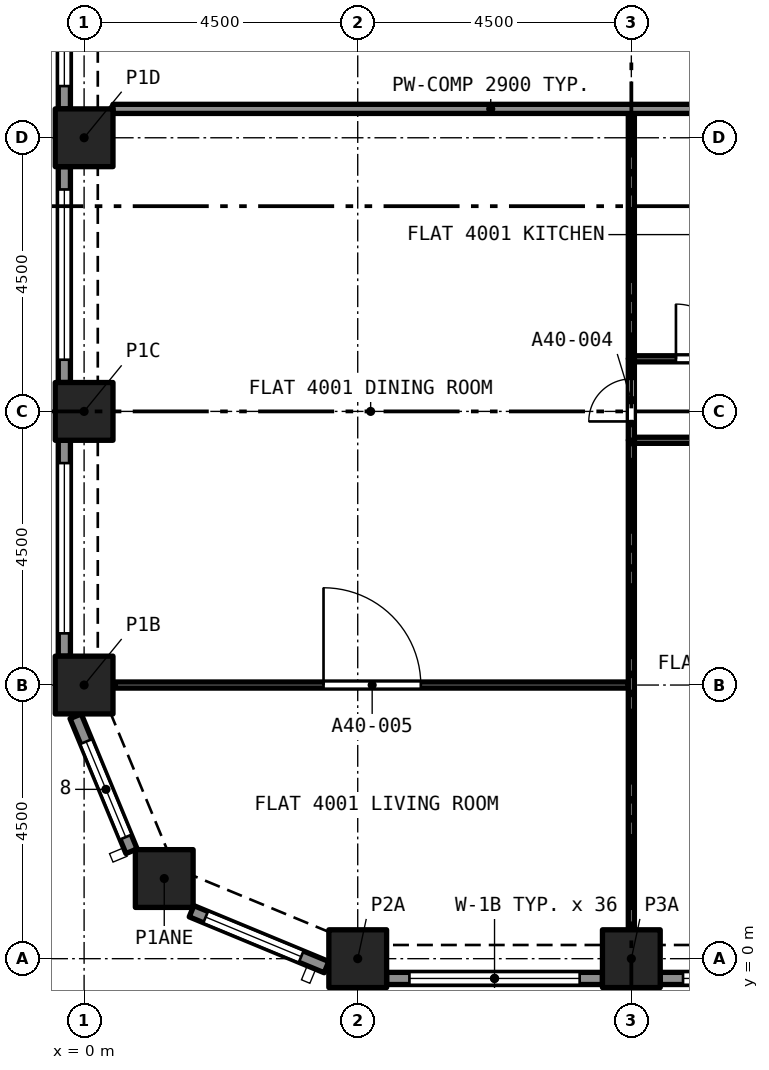
"""IFC4 building model, lengths in metres.
Left out: names, types, materials, properties, quantities, classifications, styles, units other than length and angle.
Written with IfcOpenShell. Run it as: python <this file> out.ifc"""

import sys

from ifc_helpers import new_model, si_unit, direction, frame, frame_2d, origin, origin_2d, place, context, subcontext, project, spatial, rectangle, extrude, element, fill, save


model = new_model("IFC4")
c1 = context("Model", 3, precision=1e-05, world=origin(), true_north=direction((0.0, 1.0)))
c2 = subcontext(c1, "Body", "Model", "MODEL_VIEW")
j1 = project(units=[si_unit("LENGTHUNIT", "METRE"), si_unit("PLANEANGLEUNIT", "RADIAN")], contexts=[c1])
p1 = place(None, origin())
s1 = spatial("IfcSite", under=j1, at=p1, CompositionType="ELEMENT")
p2 = place(p1, origin())
s2 = spatial("IfcBuilding", under=s1, at=p2, CompositionType="ELEMENT")
p3 = place(p2, frame((0.0, 0.0, 143.0)))
s3 = spatial("IfcBuildingStorey", under=s2, at=p3, CompositionType="ELEMENT", Elevation=143.0)
for number, where, z_axis, x_axis in (
    (1, (4.5, 0.0, 0.0), (0.0, 0.0, 1.0), (1.0, 0.0, 0.0)),
    (2, (9.0, 0.0, 0.0), (0.0, 0.0, 1.0), (1.0, 0.0, 0.0)),
    (3, (1.318, 1.318, 0.0), (0.0, 0.0, 1.0), (1.0, 0.0, 0.0)),
    (4, (0.0, 4.5, 0.0), (0.0, 0.0, 1.0), (1.0, 0.0, 0.0)),
    (5, (0.0, 9.0, 0.0), (0.0, 0.0, 1.0), (1.0, 0.0, 0.0)),
    (6, (0.0, 13.5, 0.0), (0.0, 0.0, 1.0), (1.0, 0.0, 0.0)),
):
    element("IfcColumn", number, at=place(p3, frame(where, z_axis=z_axis, x_axis=x_axis)), inside=s3, PredefinedType="COLUMN", context=c2, shape_type="SweptSolid", body=[
        extrude(rectangle(XDim=0.95, YDim=0.95, at=origin_2d()), origin(), (0.0, 0.0, 1.0), 3.2),
    ])
p4 = place(p3, frame((0.78, 1.767, 0.0), z_axis=(0.0, 0.0, 1.0), x_axis=(-0.382680855588, 0.923880599843, 0.0)))
e7 = element("IfcWall", 7, at=p4, inside=s3, PredefinedType="SOLIDWALL", context=c2, shape_type="SweptSolid", body=[
    extrude(rectangle(XDim=2.403, YDim=0.2, at=frame_2d((1.201, 0.0))), origin(), (0.0, 0.0, 1.0), 3.2),
])
p5 = place(p4, frame((0.251, 0.0, 0.45)))
e8 = element("IfcOpeningElement", 8, at=p5, cuts=e7, PredefinedType="OPENING", context=c2, shape_type="SweptSolid", body=[
    extrude(rectangle(XDim=1.7, YDim=1.95, at=frame_2d((0.85, 0.975))), frame((0.0, 0.11, 0.0), z_axis=(0.0, -1.0, 0.0), x_axis=(1.0, 0.0, 0.0)), (0.0, 0.0, 1.0), 0.22),
])
p6 = place(p3, frame((3.987, -0.139, 0.0), z_axis=(0.0, 0.0, 1.0), x_axis=(-0.923880599843, 0.382680855588, 0.0)))
e9 = element("IfcWall", 9, at=p6, inside=s3, PredefinedType="SOLIDWALL", context=c2, shape_type="SweptSolid", body=[
    extrude(rectangle(XDim=2.403, YDim=0.2, at=frame_2d((1.201, 0.0))), origin(), (0.0, 0.0, 1.0), 3.2),
])
p7 = place(p6, frame((0.451, 0.0, 0.45)))
e10 = element("IfcOpeningElement", 10, at=p7, cuts=e9, PredefinedType="OPENING", context=c2, shape_type="SweptSolid", body=[
    extrude(rectangle(XDim=1.7, YDim=1.95, at=frame_2d((0.85, 0.975))), frame((0.0, 0.11, 0.0), z_axis=(0.0, -1.0, 0.0), x_axis=(1.0, 0.0, 0.0)), (0.0, 0.0, 1.0), 0.22),
])
p8 = place(p3, frame((8.525, -0.325, 0.0), z_axis=(0.0, 0.0, 1.0), x_axis=(-1.0, 0.0, 0.0)))
e11 = element("IfcWall", 11, at=p8, inside=s3, PredefinedType="SOLIDWALL", context=c2, shape_type="SweptSolid", body=[
    extrude(rectangle(XDim=3.55, YDim=0.2, at=frame_2d((1.775, 0.0))), origin(), (0.0, 0.0, 1.0), 3.2),
])
p9 = place(p8, frame((0.375, 0.0, 0.45)))
e12 = element("IfcOpeningElement", 12, at=p9, cuts=e11, PredefinedType="OPENING", context=c2, shape_type="SweptSolid", body=[
    extrude(rectangle(XDim=2.8, YDim=1.95, at=frame_2d((1.4, 0.975))), frame((0.0, 0.11, 0.0), z_axis=(0.0, -1.0, 0.0), x_axis=(1.0, 0.0, 0.0)), (0.0, 0.0, 1.0), 0.22),
])
p10 = place(p3, frame((13.025, -0.325, 0.0), z_axis=(0.0, 0.0, 1.0), x_axis=(-1.0, 0.0, 0.0)))
e13 = element("IfcWall", 13, at=p10, inside=s3, PredefinedType="SOLIDWALL", context=c2, shape_type="SweptSolid", body=[
    extrude(rectangle(XDim=3.55, YDim=0.2, at=frame_2d((1.775, 0.0))), origin(), (0.0, 0.0, 1.0), 3.2),
])
p11 = place(p10, frame((0.375, 0.0, 0.45)))
e14 = element("IfcOpeningElement", 14, at=p11, cuts=e13, PredefinedType="OPENING", context=c2, shape_type="SweptSolid", body=[
    extrude(rectangle(XDim=2.8, YDim=1.95, at=frame_2d((1.4, 0.975))), frame((0.0, 0.11, 0.0), z_axis=(0.0, -1.0, 0.0), x_axis=(1.0, 0.0, 0.0)), (0.0, 0.0, 1.0), 0.22),
])
p12 = place(p3, frame((-0.325, 13.975, 0.0), z_axis=(0.0, 0.0, 1.0), x_axis=(0.0, 1.0, 0.0)))
e15 = element("IfcWall", 15, at=p12, inside=s3, PredefinedType="SOLIDWALL", context=c2, shape_type="SweptSolid", body=[
    extrude(rectangle(XDim=3.55, YDim=0.2, at=frame_2d((1.775, 0.0))), origin(), (0.0, 0.0, 1.0), 3.2),
])
p13 = place(p12, frame((0.375, 0.0, 0.45)))
e16 = element("IfcOpeningElement", 16, at=p13, cuts=e15, PredefinedType="OPENING", context=c2, shape_type="SweptSolid", body=[
    extrude(rectangle(XDim=2.8, YDim=1.95, at=frame_2d((1.4, 0.975))), frame((0.0, 0.11, 0.0), z_axis=(0.0, -1.0, 0.0), x_axis=(1.0, 0.0, 0.0)), (0.0, 0.0, 1.0), 0.22),
])
p14 = place(p3, frame((-0.325, 9.475, 0.0), z_axis=(0.0, 0.0, 1.0), x_axis=(0.0, 1.0, 0.0)))
e17 = element("IfcWall", 17, at=p14, inside=s3, PredefinedType="SOLIDWALL", context=c2, shape_type="SweptSolid", body=[
    extrude(rectangle(XDim=3.55, YDim=0.2, at=frame_2d((1.775, 0.0))), origin(), (0.0, 0.0, 1.0), 3.2),
])
p15 = place(p14, frame((0.375, 0.0, 0.45)))
e18 = element("IfcOpeningElement", 18, at=p15, cuts=e17, PredefinedType="OPENING", context=c2, shape_type="SweptSolid", body=[
    extrude(rectangle(XDim=2.8, YDim=1.95, at=frame_2d((1.4, 0.975))), frame((0.0, 0.11, 0.0), z_axis=(0.0, -1.0, 0.0), x_axis=(1.0, 0.0, 0.0)), (0.0, 0.0, 1.0), 0.22),
])
p16 = place(p3, frame((-0.325, 4.975, 0.0), z_axis=(0.0, 0.0, 1.0), x_axis=(0.0, 1.0, 0.0)))
e19 = element("IfcWall", 19, at=p16, inside=s3, PredefinedType="SOLIDWALL", context=c2, shape_type="SweptSolid", body=[
    extrude(rectangle(XDim=3.55, YDim=0.2, at=frame_2d((1.775, 0.0))), origin(), (0.0, 0.0, 1.0), 3.2),
])
p17 = place(p16, frame((0.375, 0.0, 0.45)))
e20 = element("IfcOpeningElement", 20, at=p17, cuts=e19, PredefinedType="OPENING", context=c2, shape_type="SweptSolid", body=[
    extrude(rectangle(XDim=2.8, YDim=1.95, at=frame_2d((1.4, 0.975))), frame((0.0, 0.11, 0.0), z_axis=(0.0, -1.0, 0.0), x_axis=(1.0, 0.0, 0.0)), (0.0, 0.0, 1.0), 0.22),
])
p18 = place(p3, frame((13.5, 8.525, 0.0), z_axis=(0.0, 0.0, 1.0), x_axis=(-1.0, 0.0, 0.0)))
e21 = element("IfcWall", 21, at=p18, inside=s3, PredefinedType="PARTITIONING", context=c2, shape_type="SweptSolid", body=[
    extrude(rectangle(XDim=4.45, YDim=0.1, at=frame_2d((2.225, 0.0))), origin(), (0.0, 0.0, 1.0), 2.9),
])
p19 = place(p18, frame((1.8, 0.0, 0.0)))
e22 = element("IfcOpeningElement", 22, at=p19, cuts=e21, PredefinedType="OPENING", context=c2, shape_type="SweptSolid", body=[
    extrude(rectangle(XDim=0.9, YDim=2.1, at=frame_2d((0.45, 1.05))), frame((0.0, 0.06, 0.0), z_axis=(0.0, -1.0, 0.0), x_axis=(1.0, 0.0, 0.0)), (0.0, 0.0, 1.0), 0.12),
])
p20 = place(p3, frame((9.0, 0.475, 0.0), z_axis=(0.0, 0.0, 1.0), x_axis=(0.0, 1.0, 0.0)))
e23 = element("IfcWall", 23, at=p20, inside=s3, PredefinedType="PARTITIONING", context=c2, shape_type="SweptSolid", body=[
    extrude(rectangle(XDim=8.05, YDim=0.1, at=frame_2d((4.025, 0.0))), origin(), (0.0, 0.0, 1.0), 2.9),
])
p21 = place(p3, frame((9.0, 8.525, 0.0), z_axis=(0.0, 0.0, 1.0), x_axis=(0.0, 1.0, 0.0)))
e24 = element("IfcWall", 24, at=p21, inside=s3, PredefinedType="PARTITIONING", context=c2, shape_type="SweptSolid", body=[
    extrude(rectangle(XDim=1.34, YDim=0.1, at=frame_2d((0.67, 0.0))), origin(), (0.0, 0.0, 1.0), 2.9),
])
p22 = place(p21, frame((0.31, 0.0, 0.0)))
e25 = element("IfcOpeningElement", 25, at=p22, cuts=e24, PredefinedType="OPENING", context=c2, shape_type="SweptSolid", body=[
    extrude(rectangle(XDim=0.7, YDim=2.1, at=frame_2d((0.35, 1.05))), frame((0.0, 0.06, 0.0), z_axis=(0.0, -1.0, 0.0), x_axis=(1.0, 0.0, 0.0)), (0.0, 0.0, 1.0), 0.12),
])
p23 = place(p3, frame((9.0, 9.865, 0.0), z_axis=(0.0, 0.0, 1.0), x_axis=(0.0, 1.0, 0.0)))
e26 = element("IfcWall", 26, at=p23, inside=s3, PredefinedType="PARTITIONING", context=c2, shape_type="SweptSolid", body=[
    extrude(rectangle(XDim=4.035, YDim=0.1, at=frame_2d((2.018, 0.0))), origin(), (0.0, 0.0, 1.0), 2.9),
])
p24 = place(p3, frame((0.514, 4.5, 0.0), z_axis=(0.0, 0.0, 1.0), x_axis=(1.0, 0.0, 0.0)))
e27 = element("IfcWall", 27, at=p24, inside=s3, PredefinedType="PARTITIONING", context=c2, shape_type="SweptSolid", body=[
    extrude(rectangle(XDim=8.436, YDim=0.1, at=frame_2d((4.218, 0.0))), origin(), (0.0, 0.0, 1.0), 2.9),
])
p25 = place(p24, frame((3.423, 0.0, 0.0)))
e28 = element("IfcOpeningElement", 28, at=p25, cuts=e27, PredefinedType="OPENING", context=c2, shape_type="SweptSolid", body=[
    extrude(rectangle(XDim=1.6, YDim=2.1, at=frame_2d((0.8, 1.05))), frame((0.0, 0.06, 0.0), z_axis=(0.0, -1.0, 0.0), x_axis=(1.0, 0.0, 0.0)), (0.0, 0.0, 1.0), 0.12),
])
p26 = place(p3, frame((0.475, 13.975, 0.0), z_axis=(0.0, 0.0, 1.0), x_axis=(1.0, 0.0, 0.0)))
e29 = element("IfcWall", 29, at=p26, inside=s3, PredefinedType="PARTITIONING", context=c2, shape_type="SweptSolid", body=[
    extrude(rectangle(XDim=12.425, YDim=0.15, at=frame_2d((6.212, 0.0))), origin(), (0.0, 0.0, 1.0), 2.9),
])
p27 = place(p3, frame((9.05, 9.865, 0.0), z_axis=(0.0, 0.0, 1.0), x_axis=(1.0, 0.0, 0.0)))
e30 = element("IfcWall", 30, at=p27, inside=s3, PredefinedType="PARTITIONING", context=c2, shape_type="SweptSolid", body=[
    extrude(rectangle(XDim=2.317, YDim=0.1, at=frame_2d((1.159, 0.0))), origin(), (0.0, 0.0, 1.0), 2.9),
])
p28 = place(p27, frame((0.684, 0.0, 0.0)))
e31 = element("IfcOpeningElement", 31, at=p28, cuts=e30, PredefinedType="OPENING", context=c2, shape_type="SweptSolid", body=[
    extrude(rectangle(XDim=0.9, YDim=2.1, at=frame_2d((0.45, 1.05))), frame((0.0, 0.06, 0.0), z_axis=(0.0, -1.0, 0.0), x_axis=(1.0, 0.0, 0.0)), (0.0, 0.0, 1.0), 0.12),
])
p29 = place(p5, origin())
e32 = element("IfcWindow", 32, at=p29, inside=s3, PartitioningType="SINGLE_PANEL", PredefinedType="WINDOW", context=c2, shape_type="SweptSolid", body=[
    extrude(rectangle(XDim=1.7, YDim=1.95, at=frame_2d((0.85, 0.975))), frame((0.0, 0.03, 0.0), z_axis=(0.0, -1.0, 0.0), x_axis=(1.0, 0.0, 0.0)), (0.0, 0.0, 1.0), 0.06),
])
fill(e8, e32)
p30 = place(p7, origin())
e33 = element("IfcWindow", 33, at=p30, inside=s3, PartitioningType="SINGLE_PANEL", PredefinedType="WINDOW", context=c2, shape_type="SweptSolid", body=[
    extrude(rectangle(XDim=1.7, YDim=1.95, at=frame_2d((0.85, 0.975))), frame((0.0, 0.03, 0.0), z_axis=(0.0, -1.0, 0.0), x_axis=(1.0, 0.0, 0.0)), (0.0, 0.0, 1.0), 0.06),
])
fill(e10, e33)
p31 = place(p9, origin())
e34 = element("IfcWindow", 34, at=p31, inside=s3, PartitioningType="SINGLE_PANEL", PredefinedType="WINDOW", context=c2, shape_type="SweptSolid", body=[
    extrude(rectangle(XDim=2.8, YDim=1.95, at=frame_2d((1.4, 0.975))), frame((0.0, 0.03, 0.0), z_axis=(0.0, -1.0, 0.0), x_axis=(1.0, 0.0, 0.0)), (0.0, 0.0, 1.0), 0.06),
])
fill(e12, e34)
p32 = place(p11, origin())
e35 = element("IfcWindow", 35, at=p32, inside=s3, PartitioningType="SINGLE_PANEL", PredefinedType="WINDOW", context=c2, shape_type="SweptSolid", body=[
    extrude(rectangle(XDim=2.8, YDim=1.95, at=frame_2d((1.4, 0.975))), frame((0.0, 0.03, 0.0), z_axis=(0.0, -1.0, 0.0), x_axis=(1.0, 0.0, 0.0)), (0.0, 0.0, 1.0), 0.06),
])
fill(e14, e35)
p33 = place(p13, origin())
e36 = element("IfcWindow", 36, at=p33, inside=s3, PartitioningType="SINGLE_PANEL", PredefinedType="WINDOW", context=c2, shape_type="SweptSolid", body=[
    extrude(rectangle(XDim=2.8, YDim=1.95, at=frame_2d((1.4, 0.975))), frame((0.0, 0.03, 0.0), z_axis=(0.0, -1.0, 0.0), x_axis=(1.0, 0.0, 0.0)), (0.0, 0.0, 1.0), 0.06),
])
fill(e16, e36)
p34 = place(p15, origin())
e37 = element("IfcWindow", 37, at=p34, inside=s3, PartitioningType="SINGLE_PANEL", PredefinedType="WINDOW", context=c2, shape_type="SweptSolid", body=[
    extrude(rectangle(XDim=2.8, YDim=1.95, at=frame_2d((1.4, 0.975))), frame((0.0, 0.03, 0.0), z_axis=(0.0, -1.0, 0.0), x_axis=(1.0, 0.0, 0.0)), (0.0, 0.0, 1.0), 0.06),
])
fill(e18, e37)
p35 = place(p17, origin())
e38 = element("IfcWindow", 38, at=p35, inside=s3, PartitioningType="SINGLE_PANEL", PredefinedType="WINDOW", context=c2, shape_type="SweptSolid", body=[
    extrude(rectangle(XDim=2.8, YDim=1.95, at=frame_2d((1.4, 0.975))), frame((0.0, 0.03, 0.0), z_axis=(0.0, -1.0, 0.0), x_axis=(1.0, 0.0, 0.0)), (0.0, 0.0, 1.0), 0.06),
])
fill(e20, e38)
p36 = place(p22, origin())
e39 = element("IfcDoor", 39, at=p36, inside=s3, OperationType="SINGLE_SWING_LEFT", PredefinedType="DOOR", context=c2, shape_type="SweptSolid", body=[
    extrude(rectangle(XDim=0.7, YDim=2.1, at=frame_2d((0.35, 1.05))), frame((0.0, 0.025, 0.0), z_axis=(0.0, -1.0, 0.0), x_axis=(1.0, 0.0, 0.0)), (0.0, 0.0, 1.0), 0.05),
])
fill(e25, e39)
p37 = place(p25, origin())
e40 = element("IfcDoor", 40, at=p37, inside=s3, OperationType="SINGLE_SWING_RIGHT", PredefinedType="DOOR", context=c2, shape_type="SweptSolid", body=[
    extrude(rectangle(XDim=1.6, YDim=2.1, at=frame_2d((0.8, 1.05))), frame((0.0, 0.025, 0.0), z_axis=(0.0, -1.0, 0.0), x_axis=(1.0, 0.0, 0.0)), (0.0, 0.0, 1.0), 0.05),
])
fill(e28, e40)
p38 = place(p28, origin())
e41 = element("IfcDoor", 41, at=p38, inside=s3, OperationType="SINGLE_SWING_LEFT", PredefinedType="DOOR", context=c2, shape_type="SweptSolid", body=[
    extrude(rectangle(XDim=0.9, YDim=2.1, at=frame_2d((0.45, 1.05))), frame((0.0, 0.025, 0.0), z_axis=(0.0, -1.0, 0.0), x_axis=(1.0, 0.0, 0.0)), (0.0, 0.0, 1.0), 0.05),
])
fill(e31, e41)
save(model, sys.argv[1])
